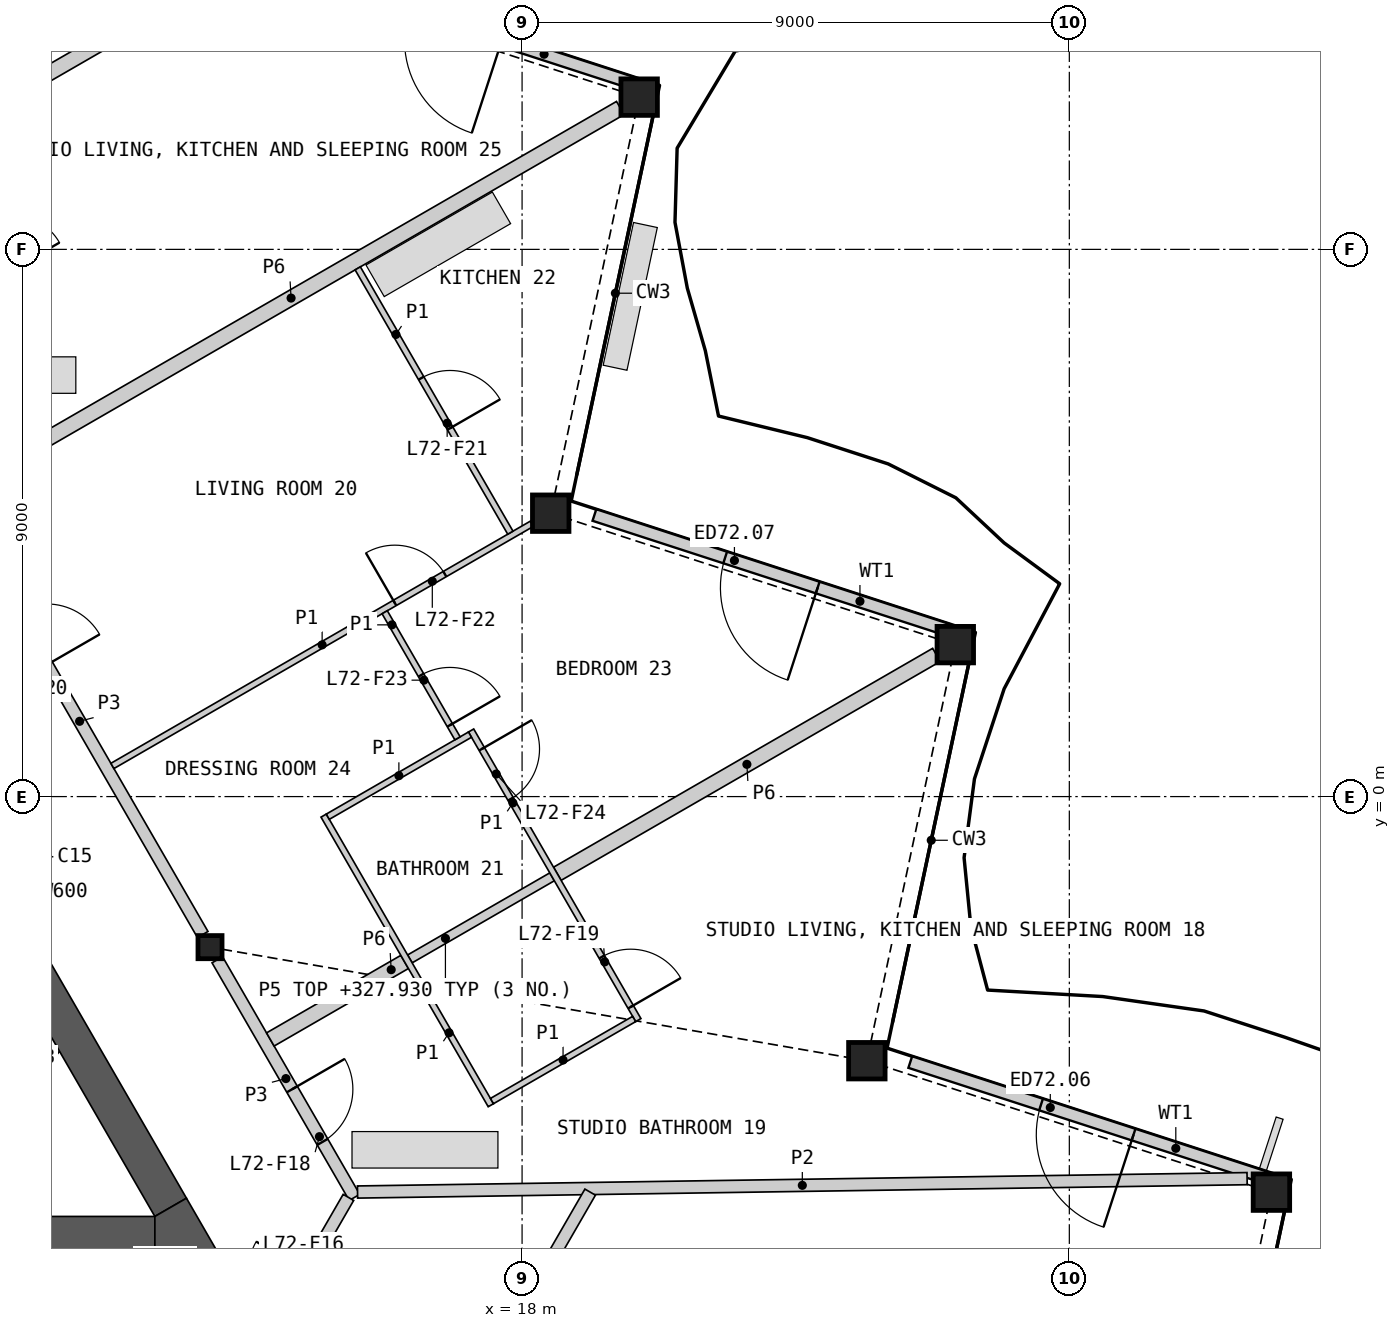
"""IFC4 building model, lengths in metres.
Left out: names, types, materials, properties, quantities, classifications, styles, units other than length and angle.
Written with IfcOpenShell. Run it as: python <this file> out.ifc"""

import sys

from ifc_helpers import new_model, si_unit, direction, frame, frame_2d, origin, origin_2d, place, context, subcontext, project, spatial, polyline, rectangle, hollow_rectangle, i_section, outline, extrude, element, fill, save


model = new_model("IFC4")
c1 = context("Model", 3, precision=1e-05, world=origin(), true_north=direction((0.0, 1.0)))
c2 = subcontext(c1, "Body", "Model", "MODEL_VIEW")
j1 = project(units=[si_unit("LENGTHUNIT", "METRE"), si_unit("PLANEANGLEUNIT", "RADIAN")], contexts=[c1])
p1 = place(None, origin())
s1 = spatial("IfcSite", under=j1, at=p1, CompositionType="ELEMENT")
p2 = place(p1, origin())
s2 = spatial("IfcBuilding", under=s1, at=p2, CompositionType="ELEMENT")
p3 = place(p2, frame((0.0, 0.0, 325.6)))
s3 = spatial("IfcBuildingStorey", under=s2, at=p3, CompositionType="ELEMENT", Elevation=325.6)
for number, where, z_axis, x_axis in (
    (1, (30.324, -6.506, 0.0), (0.0, 0.0, 1.0), (1.0, 0.0, 0.0)),
    (2, (23.67, -4.344, 0.0), (0.0, 0.0, 1.0), (1.0, 0.0, 0.0)),
    (3, (25.125, 2.499, 0.0), (0.0, 0.0, 1.0), (1.0, 0.0, 0.0)),
    (4, (18.471, 4.661, 0.0), (0.0, 0.0, 1.0), (1.0, 0.0, 0.0)),
    (5, (19.926, 11.504, 0.0), (0.0, 0.0, 1.0), (1.0, 0.0, 0.0)),
):
    element("IfcColumn", number, at=place(p3, frame(where, z_axis=z_axis, x_axis=x_axis)), inside=s3, PredefinedType="COLUMN", context=c2, shape_type="SweptSolid", body=[
        extrude(hollow_rectangle(XDim=0.6, YDim=0.6, WallThickness=0.04, at=origin_2d()), origin(), (0.0, 0.0, 1.0), 3.4),
    ])
p4 = place(p3, frame((12.868, -2.476, 0.0), z_axis=(0.0, 0.0, 1.0), x_axis=(1.0, 0.0, 0.0)))
e6 = element("IfcColumn", 6, at=p4, inside=s3, PredefinedType="COLUMN", context=c2, shape_type="SweptSolid", body=[
    extrude(i_section(OverallWidth=0.396, OverallDepth=0.381, WebThickness=0.019, FlangeThickness=0.03, at=origin_2d()), origin(), (0.0, 0.0, 1.0), 3.4),
])
p5 = place(p3, frame((30.207, -6.258, 0.0), z_axis=(0.0, 0.0, 1.0), x_axis=(-0.951056631566, 0.309016639608, 0.0)))
e7 = element("IfcWall", 7, at=p5, inside=s3, PredefinedType="SOLIDWALL", context=c2, shape_type="SweptSolid", body=[
    extrude(rectangle(XDim=6.122, YDim=0.2, at=frame_2d((3.061, 0.0))), origin(), (0.0, 0.0, 1.0), 2.488),
])
p6 = place(p5, frame((2.261, 0.0, 0.0)))
e8 = element("IfcOpeningElement", 8, at=p6, cuts=e7, PredefinedType="OPENING", context=c2, shape_type="SweptSolid", body=[
    extrude(rectangle(XDim=1.6, YDim=2.25, at=frame_2d((0.8, 1.125))), frame((0.0, 0.11, 0.0), z_axis=(0.0, -1.0, 0.0), x_axis=(1.0, 0.0, 0.0)), (0.0, 0.0, 1.0), 0.22),
])
p7 = place(p3, frame((25.012, 2.739, 0.0), z_axis=(0.0, 0.0, 1.0), x_axis=(-0.951056631566, 0.309016639608, 0.0)))
e9 = element("IfcWall", 9, at=p7, inside=s3, PredefinedType="SOLIDWALL", context=c2, shape_type="SweptSolid", body=[
    extrude(rectangle(XDim=6.122, YDim=0.2, at=frame_2d((3.061, 0.0))), origin(), (0.0, 0.0, 1.0), 2.488),
])
p8 = place(p7, frame((2.261, 0.0, 0.0)))
e10 = element("IfcOpeningElement", 10, at=p8, cuts=e9, PredefinedType="OPENING", context=c2, shape_type="SweptSolid", body=[
    extrude(rectangle(XDim=1.6, YDim=2.25, at=frame_2d((0.8, 1.125))), frame((0.0, 0.11, 0.0), z_axis=(0.0, -1.0, 0.0), x_axis=(1.0, 0.0, 0.0)), (0.0, 0.0, 1.0), 0.22),
])
p9 = place(p3, frame((19.817, 11.737, 0.0), z_axis=(0.0, 0.0, 1.0), x_axis=(-0.951056631566, 0.309016639608, 0.0)))
e11 = element("IfcWall", 11, at=p9, inside=s3, PredefinedType="SOLIDWALL", context=c2, shape_type="SweptSolid", body=[
    extrude(rectangle(XDim=6.122, YDim=0.2, at=frame_2d((3.061, 0.0))), origin(), (0.0, 0.0, 1.0), 2.488),
])
p10 = place(p9, frame((2.261, 0.0, 0.0)))
e12 = element("IfcOpeningElement", 12, at=p10, cuts=e11, PredefinedType="OPENING", context=c2, shape_type="SweptSolid", body=[
    extrude(rectangle(XDim=1.6, YDim=2.25, at=frame_2d((0.8, 1.125))), frame((0.0, 0.11, 0.0), z_axis=(0.0, -1.0, 0.0), x_axis=(1.0, 0.0, 0.0)), (0.0, 0.0, 1.0), 0.22),
])
p11 = place(p3, origin())
e13 = element("IfcWall", 13, at=p11, inside=s3, PredefinedType="SHEAR", context=c2, shape_type="SweptSolid", body=[
    extrude(outline(polyline([(8.83, -6.881), (10.374, -4.206), (10.032, -4.298), (8.738, -6.539), (8.83, -6.881)])), origin(), (0.0, 0.0, 1.0), 3.1),
])
p12 = place(p3, origin())
e14 = element("IfcWall", 14, at=p12, inside=s3, PredefinedType="SHEAR", context=c2, shape_type="SweptSolid", body=[
    extrude(outline(polyline([(10.032, -4.298), (10.374, -4.206), (5.307, -1.281), (5.182, -1.498), (10.032, -4.298)])), origin(), (0.0, 0.0, 1.0), 3.1),
])
p13 = place(p3, frame((-4.892, -7.206, 0.0), z_axis=(0.0, 0.0, 1.0), x_axis=(1.0, 0.0, 0.0)))
e15 = element("IfcWall", 15, at=p13, inside=s3, PredefinedType="SHEAR", context=c2, shape_type="SweptSolid", body=[
    extrude(rectangle(XDim=16.853, YDim=0.6, at=frame_2d((8.426, 0.0))), origin(), (0.0, 0.0, 1.0), 3.1),
])
p14 = place(p3, frame((12.221, -6.756, 0.0), z_axis=(0.0, 0.0, 1.0), x_axis=(-0.50000604952, 0.866021911064, 0.0)))
e16 = element("IfcWall", 16, at=p14, inside=s3, PredefinedType="SHEAR", context=c2, shape_type="SweptSolid", body=[
    extrude(rectangle(XDim=4.869, YDim=0.6, at=frame_2d((2.434, 0.0))), origin(), (0.0, 0.0, 1.0), 3.1),
])
p15 = place(p3, origin())
e17 = element("IfcWall", 17, at=p15, inside=s3, PredefinedType="SHEAR", context=c2, shape_type="SweptSolid", body=[
    extrude(outline(polyline([(11.961, -7.506), (11.961, -6.906), (12.48, -6.606), (13.0, -7.506), (11.961, -7.506)])), origin(), (0.0, 0.0, 1.0), 3.1),
])
p16 = place(p3, frame((8.786, 5.073, 0.0), z_axis=(0.0, 0.0, 1.0), x_axis=(0.86602139559, 0.500006942333, 0.0)))
e18 = element("IfcWall", 18, at=p16, inside=s3, PredefinedType="PARTITIONING", context=c2, shape_type="SweptSolid", body=[
    extrude(rectangle(XDim=12.505, YDim=0.25, at=frame_2d((6.252, 0.0))), origin(), (0.0, 0.0, 1.0), 2.33),
])
p17 = place(p3, frame((8.698, 4.745, 0.0), z_axis=(0.0, 0.0, 1.0), x_axis=(0.499984266882, -0.866034487114, 0.0)))
e19 = element("IfcWall", 19, at=p17, inside=s3, PredefinedType="PARTITIONING", context=c2, shape_type="SweptSolid", body=[
    extrude(rectangle(XDim=8.099, YDim=0.2, at=frame_2d((4.049, 0.0))), origin(), (0.0, 0.0, 1.0), 3.1),
])
p18 = place(p17, frame((1.976, 0.0, 0.0)))
e20 = element("IfcOpeningElement", 20, at=p18, cuts=e19, PredefinedType="OPENING", context=c2, shape_type="SweptSolid", body=[
    extrude(rectangle(XDim=1.0, YDim=2.1, at=frame_2d((0.5, 1.05))), frame((0.0, 0.11, 0.0), z_axis=(0.0, -1.0, 0.0), x_axis=(1.0, 0.0, 0.0)), (0.0, 0.0, 1.0), 0.22),
])
p19 = place(p3, frame((6.068, 9.501, 0.0), z_axis=(0.0, 0.0, 1.0), x_axis=(0.866022671543, 0.50000473235, 0.0)))
e21 = element("IfcWall", 21, at=p19, inside=s3, PredefinedType="PARTITIONING", context=c2, shape_type="SweptSolid", body=[
    extrude(rectangle(XDim=7.961, YDim=0.25, at=frame_2d((3.98, 0.0))), origin(), (0.0, 0.0, 1.0), 2.33),
])
p20 = place(p3, frame((18.58, -1.27, 0.0), z_axis=(0.0, 0.0, 1.0), x_axis=(0.866024647952, 0.500001309137, 0.0)))
e22 = element("IfcWall", 22, at=p20, inside=s3, PredefinedType="PARTITIONING", context=c2, shape_type="SweptSolid", body=[
    extrude(rectangle(XDim=7.2, YDim=0.25, at=frame_2d((3.6, 0.0))), origin(), (0.0, 0.0, 1.0), 2.33),
])
p21 = place(p3, frame((12.988, -2.684, 0.0), z_axis=(0.0, 0.0, 1.0), x_axis=(0.49999094734, -0.866030630277, 0.0)))
e23 = element("IfcWall", 23, at=p21, inside=s3, PredefinedType="PARTITIONING", context=c2, shape_type="SweptSolid", body=[
    extrude(rectangle(XDim=4.513, YDim=0.2, at=frame_2d((2.256, 0.0))), origin(), (0.0, 0.0, 1.0), 3.1),
])
p22 = place(p21, frame((2.459, 0.0, 0.0)))
e24 = element("IfcOpeningElement", 24, at=p22, cuts=e23, PredefinedType="OPENING", context=c2, shape_type="SweptSolid", body=[
    extrude(rectangle(XDim=1.0, YDim=2.1, at=frame_2d((0.5, 1.05))), frame((0.0, 0.11, 0.0), z_axis=(0.0, -1.0, 0.0), x_axis=(1.0, 0.0, 0.0)), (0.0, 0.0, 1.0), 0.22),
])
p23 = place(p3, frame((13.281, -9.819, 0.0), z_axis=(0.0, 0.0, 1.0), x_axis=(0.499958791762, 0.866049194065, 0.0)))
e25 = element("IfcWall", 25, at=p23, inside=s3, PredefinedType="PARTITIONING", context=c2, shape_type="SweptSolid", body=[
    extrude(rectangle(XDim=3.726, YDim=0.2, at=frame_2d((1.863, 0.0))), origin(), (0.0, 0.0, 1.0), 3.1),
])
p24 = place(p23, frame((1.388, 0.0, 0.0)))
e26 = element("IfcOpeningElement", 26, at=p24, cuts=e25, PredefinedType="OPENING", context=c2, shape_type="SweptSolid", body=[
    extrude(rectangle(XDim=0.95, YDim=2.1, at=frame_2d((0.475, 1.05))), frame((0.0, 0.11, 0.0), z_axis=(0.0, -1.0, 0.0), x_axis=(1.0, 0.0, 0.0)), (0.0, 0.0, 1.0), 0.22),
])
p25 = place(p3, frame((13.86, -3.995, 0.0), z_axis=(0.0, 0.0, 1.0), x_axis=(0.866030925526, 0.499990435942, 0.0)))
e27 = element("IfcWall", 27, at=p25, inside=s3, PredefinedType="PARTITIONING", context=c2, shape_type="SweptSolid", body=[
    extrude(rectangle(XDim=2.55, YDim=0.25, at=frame_2d((1.275, 0.0))), origin(), (0.0, 0.0, 1.0), 2.33),
])
p26 = place(p3, frame((15.294, -6.504, 0.0), z_axis=(0.0, 0.0, 1.0), x_axis=(0.999886982846, 0.015034012608, 0.0)))
e28 = element("IfcWall", 28, at=p26, inside=s3, PredefinedType="PARTITIONING", context=c2, shape_type="SweptSolid", body=[
    extrude(rectangle(XDim=14.632, YDim=0.2, at=frame_2d((7.316, 0.0))), origin(), (0.0, 0.0, 1.0), 2.33),
])
p27 = place(p3, frame((17.277, -9.698, 0.0), z_axis=(0.0, 0.0, 1.0), x_axis=(0.499978535015, 0.866037796245, 0.0)))
e29 = element("IfcWall", 29, at=p27, inside=s3, PredefinedType="PARTITIONING", context=c2, shape_type="SweptSolid", body=[
    extrude(rectangle(XDim=3.686, YDim=0.2, at=frame_2d((1.843, 0.0))), origin(), (0.0, 0.0, 1.0), 2.33),
])
p28 = place(p3, frame((16.155, -2.67, 0.0), z_axis=(0.0, 0.0, 1.0), x_axis=(0.86599734893, 0.500048589285, 0.0)))
e30 = element("IfcWall", 30, at=p28, inside=s3, PredefinedType="PLUMBINGWALL", context=c2, shape_type="SweptSolid", body=[
    extrude(rectangle(XDim=2.7, YDim=0.15, at=frame_2d((1.35, 0.0))), origin(), (0.0, 0.0, 1.0), 2.33),
])
p29 = place(p3, frame((11.262, 0.504, 0.0), z_axis=(0.0, 0.0, 1.0), x_axis=(0.866020217342, 0.500008983073, 0.0)))
e31 = element("IfcWall", 31, at=p29, inside=s3, PredefinedType="PARTITIONING", context=c2, shape_type="SweptSolid", body=[
    extrude(rectangle(XDim=7.966, YDim=0.1, at=frame_2d((3.983, 0.0))), origin(), (0.0, 0.0, 1.0), 2.33),
])
p30 = place(p29, frame((5.362, 0.0, 0.0)))
e32 = element("IfcOpeningElement", 32, at=p30, cuts=e31, PredefinedType="OPENING", context=c2, shape_type="SweptSolid", body=[
    extrude(rectangle(XDim=0.95, YDim=2.1, at=frame_2d((0.475, 1.05))), frame((0.0, 0.06, 0.0), z_axis=(0.0, -1.0, 0.0), x_axis=(1.0, 0.0, 0.0)), (0.0, 0.0, 1.0), 0.12),
])
p31 = place(p3, frame((17.161, 1.087, 0.0), z_axis=(0.0, 0.0, 1.0), x_axis=(0.499996545922, -0.866027397988, 0.0)))
e33 = element("IfcWall", 33, at=p31, inside=s3, PredefinedType="PARTITIONING", context=c2, shape_type="SweptSolid", body=[
    extrude(rectangle(XDim=5.5, YDim=0.1, at=frame_2d((2.75, 0.0))), origin(), (0.0, 0.0, 1.0), 2.33),
])
p32 = place(p31, frame((4.3, 0.0, 0.0)))
e34 = element("IfcOpeningElement", 34, at=p32, cuts=e33, PredefinedType="OPENING", context=c2, shape_type="SweptSolid", body=[
    extrude(rectangle(XDim=0.95, YDim=2.1, at=frame_2d((0.475, 1.05))), frame((0.0, 0.06, 0.0), z_axis=(0.0, -1.0, 0.0), x_axis=(1.0, 0.0, 0.0)), (0.0, 0.0, 1.0), 0.12),
])
p33 = place(p31, frame((0.351, 0.0, 0.0)))
e35 = element("IfcOpeningElement", 35, at=p33, cuts=e33, PredefinedType="OPENING", context=c2, shape_type="SweptSolid", body=[
    extrude(rectangle(XDim=0.95, YDim=2.1, at=frame_2d((0.475, 1.05))), frame((0.0, 0.06, 0.0), z_axis=(0.0, -1.0, 0.0), x_axis=(1.0, 0.0, 0.0)), (0.0, 0.0, 1.0), 0.12),
])
p34 = place(p3, frame((14.736, -0.313, 0.0), z_axis=(0.0, 0.0, 1.0), x_axis=(0.49997732567, -0.866038494419, 0.0)))
e36 = element("IfcWall", 36, at=p34, inside=s3, PredefinedType="PARTITIONING", context=c2, shape_type="SweptSolid", body=[
    extrude(rectangle(XDim=5.5, YDim=0.1, at=frame_2d((2.75, 0.0))), origin(), (0.0, 0.0, 1.0), 2.33),
])
p35 = place(p3, frame((15.297, 8.688, 0.0), z_axis=(0.0, 0.0, 1.0), x_axis=(0.499989096993, -0.866031698547, 0.0)))
e37 = element("IfcWall", 37, at=p35, inside=s3, PredefinedType="PARTITIONING", context=c2, shape_type="SweptSolid", body=[
    extrude(rectangle(XDim=5.02, YDim=0.1, at=frame_2d((2.51, 0.0))), origin(), (0.0, 0.0, 1.0), 2.33),
])
p36 = place(p35, frame((2.086, 0.0, 0.0)))
e38 = element("IfcOpeningElement", 38, at=p36, cuts=e37, PredefinedType="OPENING", context=c2, shape_type="SweptSolid", body=[
    extrude(rectangle(XDim=0.95, YDim=2.1, at=frame_2d((0.475, 1.05))), frame((0.0, 0.06, 0.0), z_axis=(0.0, -1.0, 0.0), x_axis=(1.0, 0.0, 0.0)), (0.0, 0.0, 1.0), 0.12),
])
p37 = place(p3, frame((17.505, -5.008, 0.0), z_axis=(0.0, 0.0, 1.0), x_axis=(0.866019956843, 0.50000943426, 0.0)))
e39 = element("IfcWall", 39, at=p37, inside=s3, PredefinedType="PARTITIONING", context=c2, shape_type="SweptSolid", body=[
    extrude(rectangle(XDim=2.7, YDim=0.1, at=frame_2d((1.35, 0.0))), origin(), (0.0, 0.0, 1.0), 2.33),
])
p38 = place(p3, frame((14.805, -0.331, 0.0), z_axis=(0.0, 0.0, 1.0), x_axis=(0.866059108428, 0.4999416173, 0.0)))
e40 = element("IfcWall", 40, at=p38, inside=s3, PredefinedType="PARTITIONING", context=c2, shape_type="SweptSolid", body=[
    extrude(rectangle(XDim=2.7, YDim=0.1, at=frame_2d((1.35, 0.0))), origin(), (0.0, 0.0, 1.0), 2.33),
])
p39 = place(p3, frame((15.74, 3.032, 0.0), z_axis=(0.0, 0.0, 1.0), x_axis=(0.500075453945, -0.865981836046, 0.0)))
e41 = element("IfcWall", 41, at=p39, inside=s3, PredefinedType="PARTITIONING", context=c2, shape_type="SweptSolid", body=[
    extrude(rectangle(XDim=2.395, YDim=0.1, at=frame_2d((1.197, 0.0))), origin(), (0.0, 0.0, 1.0), 2.33),
])
p40 = place(p39, frame((1.195, 0.0, 0.0)))
e42 = element("IfcOpeningElement", 42, at=p40, cuts=e41, PredefinedType="OPENING", context=c2, shape_type="SweptSolid", body=[
    extrude(rectangle(XDim=0.95, YDim=2.1, at=frame_2d((0.475, 1.05))), frame((0.0, 0.06, 0.0), z_axis=(0.0, -1.0, 0.0), x_axis=(1.0, 0.0, 0.0)), (0.0, 0.0, 1.0), 0.12),
])
p41 = place(p6, origin())
e43 = element("IfcDoor", 43, at=p41, inside=s3, OperationType="DOUBLE_DOOR_SINGLE_SWING", PredefinedType="DOOR", context=c2, shape_type="SweptSolid", body=[
    extrude(rectangle(XDim=1.6, YDim=2.25, at=frame_2d((0.8, 1.125))), frame((0.0, 0.025, 0.0), z_axis=(0.0, -1.0, 0.0), x_axis=(1.0, 0.0, 0.0)), (0.0, 0.0, 1.0), 0.05),
])
fill(e8, e43)
p42 = place(p8, origin())
e44 = element("IfcDoor", 44, at=p42, inside=s3, OperationType="DOUBLE_DOOR_SINGLE_SWING", PredefinedType="DOOR", context=c2, shape_type="SweptSolid", body=[
    extrude(rectangle(XDim=1.6, YDim=2.25, at=frame_2d((0.8, 1.125))), frame((0.0, 0.025, 0.0), z_axis=(0.0, -1.0, 0.0), x_axis=(1.0, 0.0, 0.0)), (0.0, 0.0, 1.0), 0.05),
])
fill(e10, e44)
p43 = place(p22, origin())
e45 = element("IfcDoor", 45, at=p43, inside=s3, OperationType="SINGLE_SWING_LEFT", PredefinedType="DOOR", context=c2, shape_type="SweptSolid", body=[
    extrude(rectangle(XDim=1.0, YDim=2.1, at=frame_2d((0.5, 1.05))), frame((0.0, 0.025, 0.0), z_axis=(0.0, -1.0, 0.0), x_axis=(1.0, 0.0, 0.0)), (0.0, 0.0, 1.0), 0.05),
])
fill(e24, e45)
p44 = place(p32, origin())
e46 = element("IfcDoor", 46, at=p44, inside=s3, OperationType="SINGLE_SWING_RIGHT", PredefinedType="DOOR", context=c2, shape_type="SweptSolid", body=[
    extrude(rectangle(XDim=0.95, YDim=2.1, at=frame_2d((0.475, 1.05))), frame((0.0, 0.025, 0.0), z_axis=(0.0, -1.0, 0.0), x_axis=(1.0, 0.0, 0.0)), (0.0, 0.0, 1.0), 0.05),
])
fill(e34, e46)
p45 = place(p36, origin())
e47 = element("IfcDoor", 47, at=p45, inside=s3, OperationType="SINGLE_SWING_RIGHT", PredefinedType="DOOR", context=c2, shape_type="SweptSolid", body=[
    extrude(rectangle(XDim=0.95, YDim=2.1, at=frame_2d((0.475, 1.05))), frame((0.0, 0.025, 0.0), z_axis=(0.0, -1.0, 0.0), x_axis=(1.0, 0.0, 0.0)), (0.0, 0.0, 1.0), 0.05),
])
fill(e38, e47)
p46 = place(p30, origin())
e48 = element("IfcDoor", 48, at=p46, inside=s3, OperationType="SINGLE_SWING_LEFT", PredefinedType="DOOR", context=c2, shape_type="SweptSolid", body=[
    extrude(rectangle(XDim=0.95, YDim=2.1, at=frame_2d((0.475, 1.05))), frame((0.0, 0.025, 0.0), z_axis=(0.0, -1.0, 0.0), x_axis=(1.0, 0.0, 0.0)), (0.0, 0.0, 1.0), 0.05),
])
fill(e32, e48)
p47 = place(p40, origin())
e49 = element("IfcDoor", 49, at=p47, inside=s3, OperationType="SINGLE_SWING_RIGHT", PredefinedType="DOOR", context=c2, shape_type="SweptSolid", body=[
    extrude(rectangle(XDim=0.95, YDim=2.1, at=frame_2d((0.475, 1.05))), frame((0.0, 0.025, 0.0), z_axis=(0.0, -1.0, 0.0), x_axis=(1.0, 0.0, 0.0)), (0.0, 0.0, 1.0), 0.05),
])
fill(e42, e49)
p48 = place(p33, origin())
e50 = element("IfcDoor", 50, at=p48, inside=s3, OperationType="SINGLE_SWING_LEFT", PredefinedType="DOOR", context=c2, shape_type="SweptSolid", body=[
    extrude(rectangle(XDim=0.95, YDim=2.1, at=frame_2d((0.475, 1.05))), frame((0.0, 0.025, 0.0), z_axis=(0.0, -1.0, 0.0), x_axis=(1.0, 0.0, 0.0)), (0.0, 0.0, 1.0), 0.05),
])
fill(e35, e50)
save(model, sys.argv[1])
